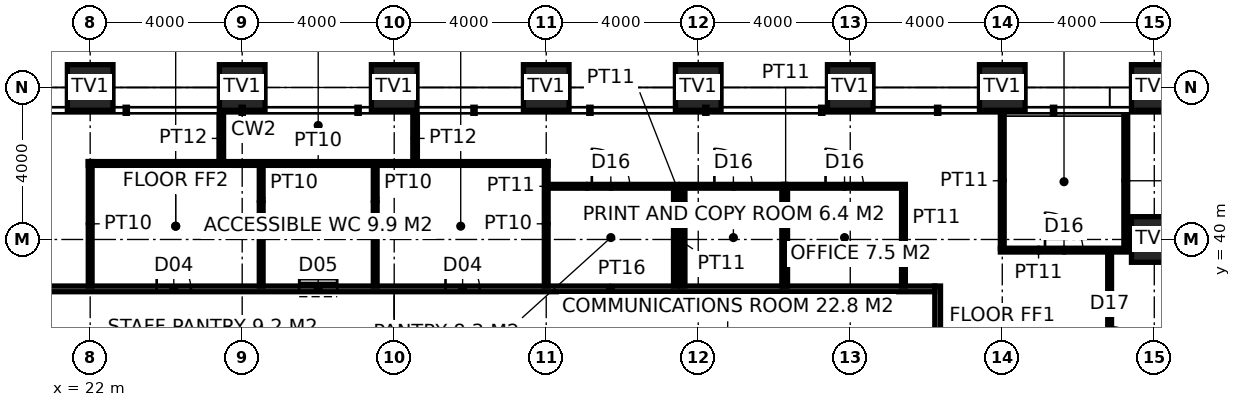
"""IFC4 building model, lengths in metres.
Left out: names, types, materials, properties, quantities, classifications, styles, units other than length and angle.
Written with IfcOpenShell. Run it as: python <this file> out.ifc"""

import sys

from ifc_helpers import new_model, si_unit, direction, frame, frame_2d, origin, origin_2d, place, context, subcontext, project, spatial, rectangle, hollow_rectangle, extrude, element, fill, save


model = new_model("IFC4")
c1 = context("Model", 3, precision=1e-05, world=origin(), true_north=direction((0.0, 1.0)))
c2 = subcontext(c1, "Body", "Model", "MODEL_VIEW")
j1 = project(units=[si_unit("LENGTHUNIT", "METRE"), si_unit("PLANEANGLEUNIT", "RADIAN")], contexts=[c1])
p1 = place(None, origin())
s1 = spatial("IfcSite", under=j1, at=p1, CompositionType="ELEMENT")
p2 = place(p1, origin())
s2 = spatial("IfcBuilding", under=s1, at=p2, CompositionType="ELEMENT")
p3 = place(p2, frame((0.0, 0.0, 11.0)))
s3 = spatial("IfcBuildingStorey", under=s2, at=p3, CompositionType="ELEMENT", Elevation=11.0)
for number, where, z_axis, x_axis in (
    (1, (22.0, 44.0, 0.0), (0.0, 0.0, 1.0), (1.0, 0.0, 0.0)),
    (2, (26.0, 44.0, 0.0), (0.0, 0.0, 1.0), (1.0, 0.0, 0.0)),
    (3, (30.0, 44.0, 0.0), (0.0, 0.0, 1.0), (1.0, 0.0, 0.0)),
    (4, (34.0, 44.0, 0.0), (0.0, 0.0, 1.0), (1.0, 0.0, 0.0)),
    (5, (38.0, 44.0, 0.0), (0.0, 0.0, 1.0), (1.0, 0.0, 0.0)),
    (6, (42.0, 44.0, 0.0), (0.0, 0.0, 1.0), (1.0, 0.0, 0.0)),
    (7, (46.0, 44.0, 0.0), (0.0, 0.0, 1.0), (1.0, 0.0, 0.0)),
    (8, (50.0, 44.0, 0.0), (0.0, 0.0, 1.0), (1.0, 0.0, 0.0)),
    (9, (50.0, 40.0, 0.0), (0.0, 0.0, 1.0), (1.0, 0.0, 0.0)),
):
    element("IfcColumn", number, at=place(p3, frame(where, z_axis=z_axis, x_axis=x_axis)), inside=s3, PredefinedType="USERDEFINED", context=c2, shape_type="SweptSolid", body=[
        extrude(hollow_rectangle(XDim=1.2, YDim=1.2, WallThickness=0.1, at=origin_2d()), origin(), (0.0, 0.0, 1.0), 4.0),
    ])
p4 = place(p3, frame((44.3, 14.625, 0.0), z_axis=(0.0, 0.0, 1.0), x_axis=(0.0, 1.0, 0.0)))
e10 = element("IfcWall", 10, at=p4, inside=s3, PredefinedType="PARTITIONING", context=c2, shape_type="SweptSolid", body=[
    extrude(rectangle(XDim=24.15, YDim=0.15, at=frame_2d((12.075, 0.0))), origin(), (0.0, 0.0, 1.0), 3.85),
])
p5 = place(p4, frame((2.824, 0.0, 0.0)))
e11 = element("IfcOpeningElement", 11, at=p5, cuts=e10, PredefinedType="OPENING", context=c2, shape_type="SweptSolid", body=[
    extrude(rectangle(XDim=1.8, YDim=2.4, at=frame_2d((0.9, 1.2))), frame((0.0, 0.085, 0.0), z_axis=(0.0, -1.0, 0.0), x_axis=(1.0, 0.0, 0.0)), (0.0, 0.0, 1.0), 0.17),
])
p6 = place(p4, frame((18.075, 0.0, 0.0)))
e12 = element("IfcOpeningElement", 12, at=p6, cuts=e10, PredefinedType="OPENING", context=c2, shape_type="SweptSolid", body=[
    extrude(rectangle(XDim=1.8, YDim=2.4, at=frame_2d((0.9, 1.2))), frame((0.0, 0.085, 0.0), z_axis=(0.0, -1.0, 0.0), x_axis=(1.0, 0.0, 0.0)), (0.0, 0.0, 1.0), 0.17),
])
p7 = place(p4, frame((10.875, 0.0, 0.0)))
e13 = element("IfcOpeningElement", 13, at=p7, cuts=e10, PredefinedType="OPENING", context=c2, shape_type="SweptSolid", body=[
    extrude(rectangle(XDim=1.0, YDim=2.2, at=frame_2d((0.5, 1.1))), frame((0.0, 0.085, 0.0), z_axis=(0.0, -1.0, 0.0), x_axis=(1.0, 0.0, 0.0)), (0.0, 0.0, 1.0), 0.17),
])
p8 = place(p3, frame((15.775, 38.7, 0.0), z_axis=(0.0, 0.0, 1.0), x_axis=(1.0, 0.0, 0.0)))
e14 = element("IfcWall", 14, at=p8, inside=s3, PredefinedType="PARTITIONING", context=c2, shape_type="SweptSolid", body=[
    extrude(rectangle(XDim=28.45, YDim=0.15, at=frame_2d((14.225, 0.0))), origin(), (0.0, 0.0, 1.0), 3.85),
])
p9 = place(p8, frame((7.975, 0.0, 0.0)))
e15 = element("IfcOpeningElement", 15, at=p9, cuts=e14, PredefinedType="OPENING", context=c2, shape_type="SweptSolid", body=[
    extrude(rectangle(XDim=0.9, YDim=2.1, at=frame_2d((0.45, 1.05))), frame((0.0, 0.085, 0.0), z_axis=(0.0, -1.0, 0.0), x_axis=(1.0, 0.0, 0.0)), (0.0, 0.0, 1.0), 0.17),
])
p10 = place(p8, frame((11.725, 0.0, 0.0)))
e16 = element("IfcOpeningElement", 16, at=p10, cuts=e14, PredefinedType="OPENING", context=c2, shape_type="SweptSolid", body=[
    extrude(rectangle(XDim=1.0, YDim=2.1, at=frame_2d((0.5, 1.05))), frame((0.0, 0.085, 0.0), z_axis=(0.0, -1.0, 0.0), x_axis=(1.0, 0.0, 0.0)), (0.0, 0.0, 1.0), 0.17),
])
p11 = place(p8, frame((15.575, 0.0, 0.0)))
e17 = element("IfcOpeningElement", 17, at=p11, cuts=e14, PredefinedType="OPENING", context=c2, shape_type="SweptSolid", body=[
    extrude(rectangle(XDim=0.9, YDim=2.1, at=frame_2d((0.45, 1.05))), frame((0.0, 0.085, 0.0), z_axis=(0.0, -1.0, 0.0), x_axis=(1.0, 0.0, 0.0)), (0.0, 0.0, 1.0), 0.17),
])
for number, where, z_axis, x_axis in (
    (18, (22.0, 38.775, 0.0), (0.0, 0.0, 1.0), (0.0, 1.0, 0.0)),
    (19, (34.0, 38.775, 0.0), (0.0, 0.0, 1.0), (0.0, 1.0, 0.0)),
):
    element("IfcWall", number, at=place(p3, frame(where, z_axis=z_axis, x_axis=x_axis)), inside=s3, PredefinedType="PARTITIONING", context=c2, shape_type="SweptSolid", body=[
        extrude(rectangle(XDim=3.275, YDim=0.1, at=frame_2d((1.638, 0.0))), origin(), (0.0, 0.0, 1.0), 2.85),
    ])
p12 = place(p3, frame((21.95, 42.0, 0.0), z_axis=(0.0, 0.0, 1.0), x_axis=(1.0, 0.0, 0.0)))
e20 = element("IfcWall", 20, at=p12, inside=s3, PredefinedType="PARTITIONING", context=c2, shape_type="SweptSolid", body=[
    extrude(rectangle(XDim=12.1, YDim=0.1, at=frame_2d((6.05, 0.0))), origin(), (0.0, 0.0, 1.0), 3.85),
])
for number, where, z_axis, x_axis in (
    (21, (26.5, 38.775, 0.0), (0.0, 0.0, 1.0), (0.0, 1.0, 0.0)),
    (22, (29.5, 38.775, 0.0), (0.0, 0.0, 1.0), (0.0, 1.0, 0.0)),
):
    element("IfcWall", number, at=place(p3, frame(where, z_axis=z_axis, x_axis=x_axis)), inside=s3, PredefinedType="PARTITIONING", context=c2, shape_type="SweptSolid", body=[
        extrude(rectangle(XDim=3.175, YDim=0.1, at=frame_2d((1.587, 0.0))), origin(), (0.0, 0.0, 1.0), 2.65),
    ])
for number, where, z_axis, x_axis in (
    (23, (25.45, 42.0, 0.0), (0.0, 0.0, 1.0), (0.0, 1.0, 0.0)),
    (24, (30.55, 42.0, 0.0), (0.0, 0.0, 1.0), (0.0, 1.0, 0.0)),
):
    element("IfcWall", number, at=place(p3, frame(where, z_axis=z_axis, x_axis=x_axis)), inside=s3, PredefinedType="PARTITIONING", context=c2, shape_type="SweptSolid", body=[
        extrude(rectangle(XDim=1.32, YDim=0.12, at=frame_2d((0.66, 0.0))), origin(), (0.0, 0.0, 1.0), 2.65),
    ])
p13 = place(p3, frame((45.95, 39.72, 0.0), z_axis=(0.0, 0.0, 1.0), x_axis=(1.0, 0.0, 0.0)))
e25 = element("IfcWall", 25, at=p13, inside=s3, PredefinedType="PARTITIONING", context=c2, shape_type="SweptSolid", body=[
    extrude(rectangle(XDim=3.35, YDim=0.1, at=frame_2d((1.675, 0.0))), origin(), (0.0, 0.0, 1.0), 3.85),
])
p14 = place(p13, frame((1.175, 0.0, 0.0)))
e26 = element("IfcOpeningElement", 26, at=p14, cuts=e25, PredefinedType="OPENING", context=c2, shape_type="SweptSolid", body=[
    extrude(rectangle(XDim=1.0, YDim=2.2, at=frame_2d((0.5, 1.1))), frame((0.0, 0.06, 0.0), z_axis=(0.0, -1.0, 0.0), x_axis=(1.0, 0.0, 0.0)), (0.0, 0.0, 1.0), 0.12),
])
p15 = place(p3, frame((34.05, 41.4, 0.0), z_axis=(0.0, 0.0, 1.0), x_axis=(1.0, 0.0, 0.0)))
e27 = element("IfcWall", 27, at=p15, inside=s3, PredefinedType="PARTITIONING", context=c2, shape_type="SweptSolid", body=[
    extrude(rectangle(XDim=3.4, YDim=0.1, at=frame_2d((1.7, 0.0))), origin(), (0.0, 0.0, 1.0), 3.85),
])
p16 = place(p15, frame((1.15, 0.0, 0.0)))
e28 = element("IfcOpeningElement", 28, at=p16, cuts=e27, PredefinedType="OPENING", context=c2, shape_type="SweptSolid", body=[
    extrude(rectangle(XDim=1.0, YDim=2.2, at=frame_2d((0.5, 1.1))), frame((0.0, 0.06, 0.0), z_axis=(0.0, -1.0, 0.0), x_axis=(1.0, 0.0, 0.0)), (0.0, 0.0, 1.0), 0.12),
])
p17 = place(p3, frame((37.55, 41.4, 0.0), z_axis=(0.0, 0.0, 1.0), x_axis=(1.0, 0.0, 0.0)))
e29 = element("IfcWall", 29, at=p17, inside=s3, PredefinedType="PARTITIONING", context=c2, shape_type="SweptSolid", body=[
    extrude(rectangle(XDim=2.75, YDim=0.1, at=frame_2d((1.375, 0.0))), origin(), (0.0, 0.0, 1.0), 3.85),
])
p18 = place(p17, frame((0.875, 0.0, 0.0)))
e30 = element("IfcOpeningElement", 30, at=p18, cuts=e29, PredefinedType="OPENING", context=c2, shape_type="SweptSolid", body=[
    extrude(rectangle(XDim=1.0, YDim=2.2, at=frame_2d((0.5, 1.1))), frame((0.0, 0.06, 0.0), z_axis=(0.0, -1.0, 0.0), x_axis=(1.0, 0.0, 0.0)), (0.0, 0.0, 1.0), 0.12),
])
p19 = place(p3, frame((40.25, 41.4, 0.0), z_axis=(0.0, 0.0, 1.0), x_axis=(1.0, 0.0, 0.0)))
e31 = element("IfcWall", 31, at=p19, inside=s3, PredefinedType="PARTITIONING", context=c2, shape_type="SweptSolid", body=[
    extrude(rectangle(XDim=3.2, YDim=0.1, at=frame_2d((1.6, 0.0))), origin(), (0.0, 0.0, 1.0), 3.85),
])
p20 = place(p19, frame((1.1, 0.0, 0.0)))
e32 = element("IfcOpeningElement", 32, at=p20, cuts=e31, PredefinedType="OPENING", context=c2, shape_type="SweptSolid", body=[
    extrude(rectangle(XDim=1.0, YDim=2.2, at=frame_2d((0.5, 1.1))), frame((0.0, 0.06, 0.0), z_axis=(0.0, -1.0, 0.0), x_axis=(1.0, 0.0, 0.0)), (0.0, 0.0, 1.0), 0.12),
])
p21 = place(p3, frame((37.4, 38.775, 0.0), z_axis=(0.0, 0.0, 1.0), x_axis=(0.0, 1.0, 0.0)))
e33 = element("IfcWall", 33, at=p21, inside=s3, PredefinedType="PARTITIONING", context=c2, shape_type="SweptSolid", body=[
    extrude(rectangle(XDim=2.575, YDim=0.1, at=frame_2d((1.288, 0.0))), origin(), (0.0, 0.0, 1.0), 3.85),
])
p22 = place(p3, frame((37.6, 38.775, 0.0), z_axis=(0.0, 0.0, 1.0), x_axis=(0.0, 1.0, 0.0)))
e34 = element("IfcWall", 34, at=p22, inside=s3, PredefinedType="PARTITIONING", context=c2, shape_type="SweptSolid", body=[
    extrude(rectangle(XDim=2.575, YDim=0.1, at=frame_2d((1.288, 0.0))), origin(), (0.0, 0.0, 1.0), 2.85),
])
for number, where, z_axis, x_axis in (
    (35, (40.25, 38.775, 0.0), (0.0, 0.0, 1.0), (0.0, 1.0, 0.0)),
    (36, (40.3, 38.775, 0.0), (0.0, 0.0, 1.0), (0.0, 1.0, 0.0)),
    (37, (43.4, 38.775, 0.0), (0.0, 0.0, 1.0), (0.0, 1.0, 0.0)),
):
    element("IfcWall", number, at=place(p3, frame(where, z_axis=z_axis, x_axis=x_axis)), inside=s3, PredefinedType="PARTITIONING", context=c2, shape_type="SweptSolid", body=[
        extrude(rectangle(XDim=2.575, YDim=0.1, at=frame_2d((1.288, 0.0))), origin(), (0.0, 0.0, 1.0), 3.85),
    ])
p23 = place(p3, frame((46.0, 39.77, 0.0), z_axis=(0.0, 0.0, 1.0), x_axis=(0.0, 1.0, 0.0)))
e38 = element("IfcWall", 38, at=p23, inside=s3, PredefinedType="PARTITIONING", context=c2, shape_type="SweptSolid", body=[
    extrude(rectangle(XDim=3.55, YDim=0.1, at=frame_2d((1.775, 0.0))), origin(), (0.0, 0.0, 1.0), 2.85),
])
p24 = place(p3, frame((49.25, 39.77, 0.0), z_axis=(0.0, 0.0, 1.0), x_axis=(0.0, 1.0, 0.0)))
e39 = element("IfcWall", 39, at=p24, inside=s3, PredefinedType="PARTITIONING", context=c2, shape_type="SweptSolid", body=[
    extrude(rectangle(XDim=3.55, YDim=0.1, at=frame_2d((1.775, 0.0))), origin(), (0.0, 0.0, 1.0), 3.85),
])
p25 = place(p3, frame((48.825, 39.67, 0.0), z_axis=(0.0, 0.0, 1.0), x_axis=(0.0, -1.0, 0.0)))
e40 = element("IfcWall", 40, at=p25, inside=s3, PredefinedType="PARTITIONING", context=c2, shape_type="SweptSolid", body=[
    extrude(rectangle(XDim=11.119, YDim=0.1, at=frame_2d((5.56, 0.0))), origin(), (0.0, 0.0, 1.0), 3.85),
])
p26 = place(p25, frame((1.959, 0.0, 0.0)))
e41 = element("IfcOpeningElement", 41, at=p26, cuts=e40, PredefinedType="OPENING", context=c2, shape_type="SweptSolid", body=[
    extrude(rectangle(XDim=1.0, YDim=2.2, at=frame_2d((0.5, 1.1))), frame((0.0, 0.06, 0.0), z_axis=(0.0, -1.0, 0.0), x_axis=(1.0, 0.0, 0.0)), (0.0, 0.0, 1.0), 0.12),
])
p27 = place(p9, origin())
e42 = element("IfcDoor", 42, at=p27, inside=s3, OperationType="SINGLE_SWING_LEFT", PredefinedType="DOOR", context=c2, shape_type="SweptSolid", body=[
    extrude(rectangle(XDim=0.9, YDim=2.1, at=frame_2d((0.45, 1.05))), frame((0.0, 0.025, 0.0), z_axis=(0.0, -1.0, 0.0), x_axis=(1.0, 0.0, 0.0)), (0.0, 0.0, 1.0), 0.05),
])
fill(e15, e42)
p28 = place(p10, origin())
e43 = element("IfcDoor", 43, at=p28, inside=s3, OperationType="SLIDING_TO_LEFT", PredefinedType="DOOR", context=c2, shape_type="SweptSolid", body=[
    extrude(rectangle(XDim=1.0, YDim=2.1, at=frame_2d((0.5, 1.05))), frame((0.0, 0.025, 0.0), z_axis=(0.0, -1.0, 0.0), x_axis=(1.0, 0.0, 0.0)), (0.0, 0.0, 1.0), 0.05),
])
fill(e16, e43)
p29 = place(p11, origin())
e44 = element("IfcDoor", 44, at=p29, inside=s3, OperationType="SINGLE_SWING_LEFT", PredefinedType="DOOR", context=c2, shape_type="SweptSolid", body=[
    extrude(rectangle(XDim=0.9, YDim=2.1, at=frame_2d((0.45, 1.05))), frame((0.0, 0.025, 0.0), z_axis=(0.0, -1.0, 0.0), x_axis=(1.0, 0.0, 0.0)), (0.0, 0.0, 1.0), 0.05),
])
fill(e17, e44)
p30 = place(p14, origin())
e45 = element("IfcDoor", 45, at=p30, inside=s3, OperationType="SINGLE_SWING_LEFT", PredefinedType="DOOR", context=c2, shape_type="SweptSolid", body=[
    extrude(rectangle(XDim=1.0, YDim=2.2, at=frame_2d((0.5, 1.1))), frame((0.0, 0.025, 0.0), z_axis=(0.0, -1.0, 0.0), x_axis=(1.0, 0.0, 0.0)), (0.0, 0.0, 1.0), 0.05),
])
fill(e26, e45)
p31 = place(p16, origin())
e46 = element("IfcDoor", 46, at=p31, inside=s3, OperationType="SINGLE_SWING_LEFT", PredefinedType="DOOR", context=c2, shape_type="SweptSolid", body=[
    extrude(rectangle(XDim=1.0, YDim=2.2, at=frame_2d((0.5, 1.1))), frame((0.0, 0.025, 0.0), z_axis=(0.0, -1.0, 0.0), x_axis=(1.0, 0.0, 0.0)), (0.0, 0.0, 1.0), 0.05),
])
fill(e28, e46)
p32 = place(p18, origin())
e47 = element("IfcDoor", 47, at=p32, inside=s3, OperationType="SINGLE_SWING_LEFT", PredefinedType="DOOR", context=c2, shape_type="SweptSolid", body=[
    extrude(rectangle(XDim=1.0, YDim=2.2, at=frame_2d((0.5, 1.1))), frame((0.0, 0.025, 0.0), z_axis=(0.0, -1.0, 0.0), x_axis=(1.0, 0.0, 0.0)), (0.0, 0.0, 1.0), 0.05),
])
fill(e30, e47)
p33 = place(p20, origin())
e48 = element("IfcDoor", 48, at=p33, inside=s3, OperationType="SINGLE_SWING_LEFT", PredefinedType="DOOR", context=c2, shape_type="SweptSolid", body=[
    extrude(rectangle(XDim=1.0, YDim=2.2, at=frame_2d((0.5, 1.1))), frame((0.0, 0.025, 0.0), z_axis=(0.0, -1.0, 0.0), x_axis=(1.0, 0.0, 0.0)), (0.0, 0.0, 1.0), 0.05),
])
fill(e32, e48)
p34 = place(p26, origin())
e49 = element("IfcDoor", 49, at=p34, inside=s3, OperationType="SINGLE_SWING_RIGHT", PredefinedType="DOOR", context=c2, shape_type="SweptSolid", body=[
    extrude(rectangle(XDim=1.0, YDim=2.2, at=frame_2d((0.5, 1.1))), frame((0.0, 0.025, 0.0), z_axis=(0.0, -1.0, 0.0), x_axis=(1.0, 0.0, 0.0)), (0.0, 0.0, 1.0), 0.05),
])
fill(e41, e49)
save(model, sys.argv[1])
